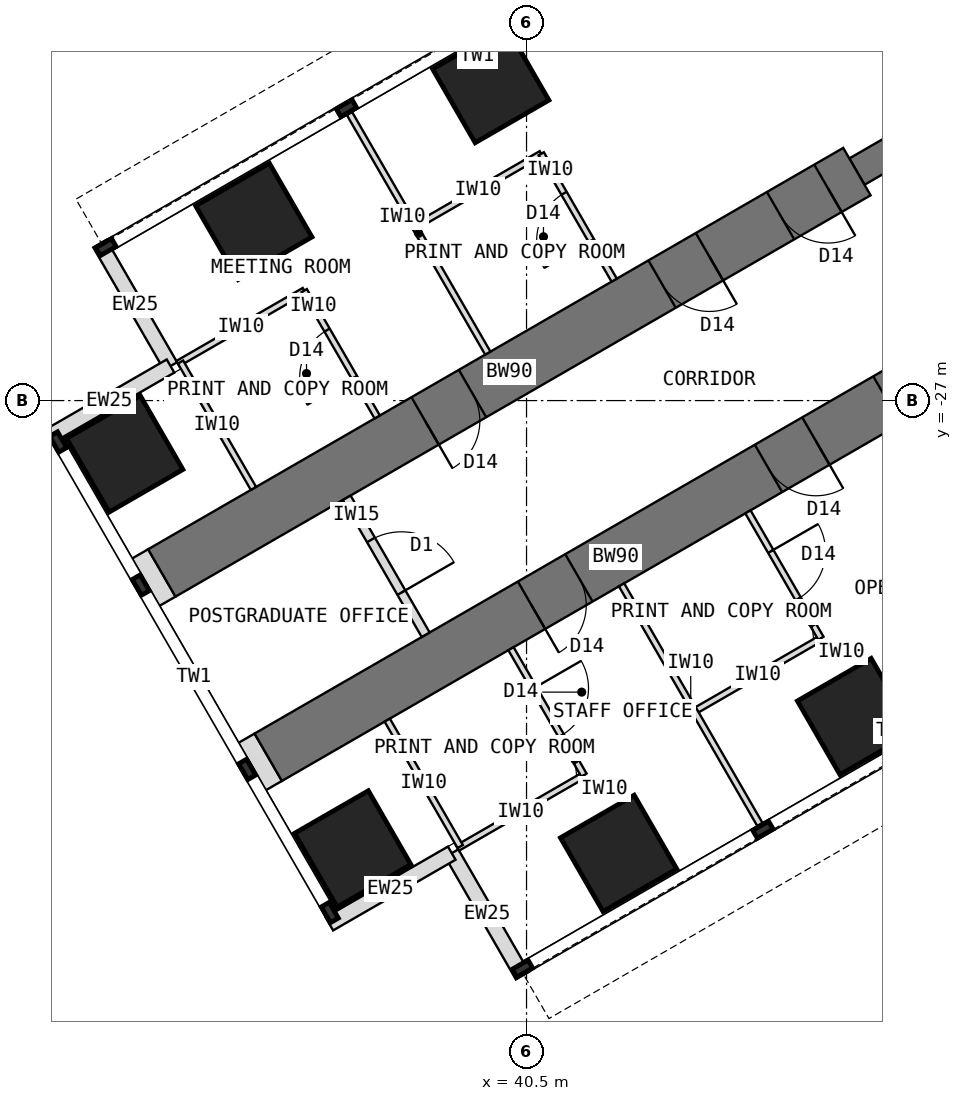
"""IFC4 building model, lengths in metres.
Left out: names, types, materials, properties, quantities, classifications, styles, units other than length and angle.
Written with IfcOpenShell. Run it as: python <this file> out.ifc"""

import sys

from ifc_helpers import new_model, si_unit, direction, frame, frame_2d, origin, origin_2d, place, context, subcontext, project, spatial, rectangle, extrude, element, fill, save


model = new_model("IFC4")
c1 = context("Model", 3, precision=1e-05, world=origin(), true_north=direction((0.0, 1.0)))
c2 = subcontext(c1, "Body", "Model", "MODEL_VIEW")
j1 = project(units=[si_unit("LENGTHUNIT", "METRE"), si_unit("PLANEANGLEUNIT", "RADIAN")], contexts=[c1])
p1 = place(None, origin())
s1 = spatial("IfcSite", under=j1, at=p1, CompositionType="ELEMENT")
p2 = place(p1, origin())
s2 = spatial("IfcBuilding", under=s1, at=p2, CompositionType="ELEMENT")
p3 = place(p2, frame((0.0, 0.0, 80.5)))
s3 = spatial("IfcBuildingStorey", under=s2, at=p3, CompositionType="ELEMENT", Elevation=80.5)
p4 = place(p3, frame((45.904, -18.0, 0.0), z_axis=(0.0, 0.0, 1.0), x_axis=(0.500024481964, -0.866011268655, 0.0)))
e1 = element("IfcWall", 1, at=p4, inside=s3, PredefinedType="SHEAR", context=c2, shape_type="SweptSolid", body=[
    extrude(rectangle(XDim=4.548, YDim=0.7, at=frame_2d((2.274, 0.0))), origin(), (0.0, 0.0, 1.0), 4.0),
])
p5 = place(p3, frame((47.684, -26.266, 0.0), z_axis=(0.0, 0.0, 1.0), x_axis=(-0.866027579429, -0.499996231654, 0.0)))
e2 = element("IfcWall", 2, at=p5, inside=s3, PredefinedType="SHEAR", context=c2, shape_type="SweptSolid", body=[
    extrude(rectangle(XDim=13.2, YDim=0.9, at=frame_2d((6.6, 0.0))), origin(), (0.0, 0.0, 1.0), 4.0),
])
p6 = place(p5, frame((0.55, 0.0, 0.0)))
e3 = element("IfcOpeningElement", 3, at=p6, cuts=e2, PredefinedType="OPENING", context=c2, shape_type="SweptSolid", body=[
    extrude(rectangle(XDim=0.9, YDim=2.1, at=frame_2d((0.45, 1.05))), frame((0.0, 0.46, 0.0), z_axis=(0.0, -1.0, 0.0), x_axis=(1.0, 0.0, 0.0)), (0.0, 0.0, 1.0), 0.92),
])
p7 = place(p5, frame((2.8, 0.0, 0.0)))
e4 = element("IfcOpeningElement", 4, at=p7, cuts=e2, PredefinedType="OPENING", context=c2, shape_type="SweptSolid", body=[
    extrude(rectangle(XDim=0.9, YDim=2.1, at=frame_2d((0.45, 1.05))), frame((0.0, 0.46, 0.0), z_axis=(0.0, -1.0, 0.0), x_axis=(1.0, 0.0, 0.0)), (0.0, 0.0, 1.0), 0.92),
])
p8 = place(p5, frame((7.3, 0.0, 0.0)))
e5 = element("IfcOpeningElement", 5, at=p8, cuts=e2, PredefinedType="OPENING", context=c2, shape_type="SweptSolid", body=[
    extrude(rectangle(XDim=0.9, YDim=2.1, at=frame_2d((0.45, 1.05))), frame((0.0, 0.46, 0.0), z_axis=(0.0, -1.0, 0.0), x_axis=(1.0, 0.0, 0.0)), (0.0, 0.0, 1.0), 0.92),
])
p9 = place(p3, frame((48.178, -21.939, 0.0), z_axis=(0.0, 0.0, 1.0), x_axis=(-0.866072649678, -0.499918158782, 0.0)))
e6 = element("IfcWall", 6, at=p9, inside=s3, PredefinedType="SHEAR", context=c2, shape_type="SweptSolid", body=[
    extrude(rectangle(XDim=2.592, YDim=0.5, at=frame_2d((1.296, 0.0))), origin(), (0.0, 0.0, 1.0), 4.0),
])
p10 = place(p3, frame((45.934, -23.234, 0.0), z_axis=(0.0, 0.0, 1.0), x_axis=(-0.866019570528, -0.500010103361, 0.0)))
e7 = element("IfcWall", 7, at=p10, inside=s3, PredefinedType="SHEAR", context=c2, shape_type="SweptSolid", body=[
    extrude(rectangle(XDim=13.2, YDim=0.9, at=frame_2d((6.6, 0.0))), origin(), (0.0, 0.0, 1.0), 4.0),
])
p11 = place(p10, frame((0.55, 0.0, 0.0)))
e8 = element("IfcOpeningElement", 8, at=p11, cuts=e7, PredefinedType="OPENING", context=c2, shape_type="SweptSolid", body=[
    extrude(rectangle(XDim=0.9, YDim=2.1, at=frame_2d((0.45, 1.05))), frame((0.0, 0.46, 0.0), z_axis=(0.0, -1.0, 0.0), x_axis=(1.0, 0.0, 0.0)), (0.0, 0.0, 1.0), 0.92),
])
p12 = place(p10, frame((2.8, 0.0, 0.0)))
e9 = element("IfcOpeningElement", 9, at=p12, cuts=e7, PredefinedType="OPENING", context=c2, shape_type="SweptSolid", body=[
    extrude(rectangle(XDim=0.9, YDim=2.1, at=frame_2d((0.45, 1.05))), frame((0.0, 0.46, 0.0), z_axis=(0.0, -1.0, 0.0), x_axis=(1.0, 0.0, 0.0)), (0.0, 0.0, 1.0), 0.92),
])
p13 = place(p10, frame((7.3, 0.0, 0.0)))
e10 = element("IfcOpeningElement", 10, at=p13, cuts=e7, PredefinedType="OPENING", context=c2, shape_type="SweptSolid", body=[
    extrude(rectangle(XDim=0.9, YDim=2.1, at=frame_2d((0.45, 1.05))), frame((0.0, 0.46, 0.0), z_axis=(0.0, -1.0, 0.0), x_axis=(1.0, 0.0, 0.0)), (0.0, 0.0, 1.0), 0.92),
])
for number, where, z_axis, x_axis in (
    (11, (45.912, -32.196, 0.0), (0.0, 0.0, 1.0), (0.866, 0.5, 0.0)),
    (12, (39.912, -21.804, 0.0), (0.0, 0.0, 1.0), (0.866, 0.5, 0.0)),
    (13, (42.014, -34.446, 0.0), (0.0, 0.0, 1.0), (0.866, 0.5, 0.0)),
    (14, (36.014, -24.054, 0.0), (0.0, 0.0, 1.0), (0.866, 0.5, 0.0)),
    (15, (37.642, -34.373, 0.0), (0.0, 0.0, 1.0), (0.866, 0.5, 0.0)),
    (16, (33.892, -27.877, 0.0), (0.0, 0.0, 1.0), (0.866, 0.5, 0.0)),
):
    element("IfcColumn", number, at=place(p3, frame(where, z_axis=z_axis, x_axis=x_axis)), inside=s3, PredefinedType="COLUMN", context=c2, shape_type="SweptSolid", body=[
        extrude(rectangle(XDim=1.4, YDim=1.4, at=origin_2d()), origin(), (0.0, 0.0, 1.0), 4.0),
    ])
for number, where, z_axis, x_axis in (
    (17, (40.433, -36.456, 0.0), (0.0, 0.0, 1.0), (-0.5, 0.866, 0.0)),
    (18, (39.27, -34.443, 0.0), (0.0, 0.0, 1.0), (-0.866, -0.5, 0.0)),
    (19, (33.483, -24.419, 0.0), (0.0, 0.0, 1.0), (0.5, -0.866, 0.0)),
    (20, (34.645, -26.432, 0.0), (0.0, 0.0, 1.0), (-0.866, -0.5, 0.0)),
):
    element("IfcWall", number, at=place(p3, frame(where, z_axis=z_axis, x_axis=x_axis)), inside=s3, PredefinedType="STANDARD", context=c2, shape_type="SweptSolid", body=[
        extrude(rectangle(XDim=2.325, YDim=0.25, at=frame_2d((1.163, 0.0))), origin(), (0.0, 0.0, 1.0), 3.8),
    ])
for number, where, z_axis, x_axis in (
    (21, (36.252, -32.865, 0.0), (0.0, 0.0, 1.0), (-0.866, -0.5, 0.0)),
    (22, (34.502, -29.834, 0.0), (0.0, 0.0, 1.0), (-0.866, -0.5, 0.0)),
):
    element("IfcWall", number, at=place(p3, frame(where, z_axis=z_axis, x_axis=x_axis)), inside=s3, PredefinedType="PARTITIONING", context=c2, shape_type="SweptSolid", body=[
        extrude(rectangle(XDim=0.31, YDim=0.9, at=frame_2d((0.155, 0.0))), origin(), (0.0, 0.0, 1.0), 3.8),
    ])
p14 = place(p3, frame((42.063, -30.03, 0.0), z_axis=(0.0, 0.0, 1.0), x_axis=(0.499982560684, -0.866035472144, 0.0)))
e23 = element("IfcWall", 23, at=p14, inside=s3, PredefinedType="PARTITIONING", context=c2, shape_type="SweptSolid", body=[
    extrude(rectangle(XDim=4.55, YDim=0.1, at=frame_2d((2.275, 0.0))), origin(), (0.0, 0.0, 1.0), 3.8),
])
p15 = place(p3, frame((45.342, -30.909, 0.0), z_axis=(0.0, 0.0, 1.0), x_axis=(-0.866050077142, -0.499957262057, 0.0)))
e24 = element("IfcWall", 24, at=p15, inside=s3, PredefinedType="PARTITIONING", context=c2, shape_type="SweptSolid", body=[
    extrude(rectangle(XDim=2.4, YDim=0.1, at=frame_2d((1.2, 0.0))), origin(), (0.0, 0.0, 1.0), 3.8),
])
p16 = place(p3, frame((44.141, -28.83, 0.0), z_axis=(0.0, 0.0, 1.0), x_axis=(0.500077600433, -0.865980596518, 0.0)))
e25 = element("IfcWall", 25, at=p16, inside=s3, PredefinedType="PARTITIONING", context=c2, shape_type="SweptSolid", body=[
    extrude(rectangle(XDim=2.4, YDim=0.1, at=frame_2d((1.2, 0.0))), origin(), (0.0, 0.0, 1.0), 3.8),
])
p17 = place(p16, frame((0.75, 0.0, 0.0)))
e26 = element("IfcOpeningElement", 26, at=p17, cuts=e25, PredefinedType="OPENING", context=c2, shape_type="SweptSolid", body=[
    extrude(rectangle(XDim=0.9, YDim=2.1, at=frame_2d((0.45, 1.05))), frame((0.0, 0.06, 0.0), z_axis=(0.0, -1.0, 0.0), x_axis=(1.0, 0.0, 0.0)), (0.0, 0.0, 1.0), 0.12),
])
p18 = place(p3, frame((41.444, -33.159, 0.0), z_axis=(0.0, 0.0, 1.0), x_axis=(-0.866024647952, -0.500001309137, 0.0)))
e27 = element("IfcWall", 27, at=p18, inside=s3, PredefinedType="PARTITIONING", context=c2, shape_type="SweptSolid", body=[
    extrude(rectangle(XDim=2.4, YDim=0.1, at=frame_2d((1.2, 0.0))), origin(), (0.0, 0.0, 1.0), 3.8),
])
p19 = place(p3, frame((40.244, -31.08, 0.0), z_axis=(0.0, 0.0, 1.0), x_axis=(0.500001309137, -0.866024647952, 0.0)))
e28 = element("IfcWall", 28, at=p19, inside=s3, PredefinedType="PARTITIONING", context=c2, shape_type="SweptSolid", body=[
    extrude(rectangle(XDim=2.4, YDim=0.1, at=frame_2d((1.2, 0.0))), origin(), (0.0, 0.0, 1.0), 3.8),
])
p20 = place(p19, frame((0.75, 0.0, 0.0)))
e29 = element("IfcOpeningElement", 29, at=p20, cuts=e28, PredefinedType="OPENING", context=c2, shape_type="SweptSolid", body=[
    extrude(rectangle(XDim=0.9, YDim=2.1, at=frame_2d((0.45, 1.05))), frame((0.0, 0.06, 0.0), z_axis=(0.0, -1.0, 0.0), x_axis=(1.0, 0.0, 0.0)), (0.0, 0.0, 1.0), 0.12),
])
p21 = place(p3, frame((38.209, -32.255, 0.0), z_axis=(0.0, 0.0, 1.0), x_axis=(0.500001309137, -0.866024647952, 0.0)))
e30 = element("IfcWall", 30, at=p21, inside=s3, PredefinedType="PARTITIONING", context=c2, shape_type="SweptSolid", body=[
    extrude(rectangle(XDim=2.4, YDim=0.1, at=frame_2d((1.2, 0.0))), origin(), (0.0, 0.0, 1.0), 3.8),
])
p22 = place(p3, frame((39.863, -26.22, 0.0), z_axis=(0.0, 0.0, 1.0), x_axis=(-0.500022803284, 0.866012237902, 0.0)))
e31 = element("IfcWall", 31, at=p22, inside=s3, PredefinedType="PARTITIONING", context=c2, shape_type="SweptSolid", body=[
    extrude(rectangle(XDim=4.55, YDim=0.1, at=frame_2d((2.275, 0.0))), origin(), (0.0, 0.0, 1.0), 3.8),
])
p23 = place(p3, frame((40.741, -22.941, 0.0), z_axis=(0.0, 0.0, 1.0), x_axis=(-0.865980596518, -0.500077600433, 0.0)))
e32 = element("IfcWall", 32, at=p23, inside=s3, PredefinedType="PARTITIONING", context=c2, shape_type="SweptSolid", body=[
    extrude(rectangle(XDim=2.4, YDim=0.1, at=frame_2d((1.2, 0.0))), origin(), (0.0, 0.0, 1.0), 3.8),
])
p24 = place(p3, frame((41.941, -25.02, 0.0), z_axis=(0.0, 0.0, 1.0), x_axis=(-0.499957262057, 0.866050077142, 0.0)))
e33 = element("IfcWall", 33, at=p24, inside=s3, PredefinedType="PARTITIONING", context=c2, shape_type="SweptSolid", body=[
    extrude(rectangle(XDim=2.4, YDim=0.1, at=frame_2d((1.2, 0.0))), origin(), (0.0, 0.0, 1.0), 3.8),
])
p25 = place(p24, frame((0.75, 0.0, 0.0)))
e34 = element("IfcOpeningElement", 34, at=p25, cuts=e33, PredefinedType="OPENING", context=c2, shape_type="SweptSolid", body=[
    extrude(rectangle(XDim=0.9, YDim=2.1, at=frame_2d((0.45, 1.05))), frame((0.0, 0.06, 0.0), z_axis=(0.0, -1.0, 0.0), x_axis=(1.0, 0.0, 0.0)), (0.0, 0.0, 1.0), 0.12),
])
p26 = place(p3, frame((36.844, -25.191, 0.0), z_axis=(0.0, 0.0, 1.0), x_axis=(-0.865980596518, -0.500077600433, 0.0)))
e35 = element("IfcWall", 35, at=p26, inside=s3, PredefinedType="PARTITIONING", context=c2, shape_type="SweptSolid", body=[
    extrude(rectangle(XDim=2.4, YDim=0.1, at=frame_2d((1.2, 0.0))), origin(), (0.0, 0.0, 1.0), 3.8),
])
p27 = place(p3, frame((38.044, -27.27, 0.0), z_axis=(0.0, 0.0, 1.0), x_axis=(-0.500033551112, 0.866006032174, 0.0)))
e36 = element("IfcWall", 36, at=p27, inside=s3, PredefinedType="PARTITIONING", context=c2, shape_type="SweptSolid", body=[
    extrude(rectangle(XDim=2.4, YDim=0.1, at=frame_2d((1.2, 0.0))), origin(), (0.0, 0.0, 1.0), 3.8),
])
p28 = place(p27, frame((0.75, 0.0, 0.0)))
e37 = element("IfcOpeningElement", 37, at=p28, cuts=e36, PredefinedType="OPENING", context=c2, shape_type="SweptSolid", body=[
    extrude(rectangle(XDim=0.9, YDim=2.1, at=frame_2d((0.45, 1.05))), frame((0.0, 0.06, 0.0), z_axis=(0.0, -1.0, 0.0), x_axis=(1.0, 0.0, 0.0)), (0.0, 0.0, 1.0), 0.12),
])
p29 = place(p3, frame((36.009, -28.445, 0.0), z_axis=(0.0, 0.0, 1.0), x_axis=(-0.500033551112, 0.866006032174, 0.0)))
e38 = element("IfcWall", 38, at=p29, inside=s3, PredefinedType="PARTITIONING", context=c2, shape_type="SweptSolid", body=[
    extrude(rectangle(XDim=2.4, YDim=0.1, at=frame_2d((1.2, 0.0))), origin(), (0.0, 0.0, 1.0), 3.8),
])
p30 = place(p3, frame((37.542, -28.599, 0.0), z_axis=(0.0, 0.0, 1.0), x_axis=(0.500006934395, -0.866021400173, 0.0)))
e39 = element("IfcWall", 39, at=p30, inside=s3, PredefinedType="PARTITIONING", context=c2, shape_type="SweptSolid", body=[
    extrude(rectangle(XDim=2.6, YDim=0.15, at=frame_2d((1.3, 0.0))), origin(), (0.0, 0.0, 1.0), 3.8),
])
p31 = place(p30, frame((0.8, 0.0, 0.0)))
e40 = element("IfcOpeningElement", 40, at=p31, cuts=e39, PredefinedType="OPENING", context=c2, shape_type="SweptSolid", body=[
    extrude(rectangle(XDim=1.0, YDim=2.1, at=frame_2d((0.5, 1.05))), frame((0.0, 0.085, 0.0), z_axis=(0.0, -1.0, 0.0), x_axis=(1.0, 0.0, 0.0)), (0.0, 0.0, 1.0), 0.17),
])
p32 = place(p17, origin())
e41 = element("IfcDoor", 41, at=p32, inside=s3, OperationType="SINGLE_SWING_LEFT", PredefinedType="DOOR", context=c2, shape_type="SweptSolid", body=[
    extrude(rectangle(XDim=0.9, YDim=2.1, at=frame_2d((0.45, 1.05))), frame((0.0, 0.025, 0.0), z_axis=(0.0, -1.0, 0.0), x_axis=(1.0, 0.0, 0.0)), (0.0, 0.0, 1.0), 0.05),
])
fill(e26, e41)
p33 = place(p20, origin())
e42 = element("IfcDoor", 42, at=p33, inside=s3, OperationType="SINGLE_SWING_LEFT", PredefinedType="DOOR", context=c2, shape_type="SweptSolid", body=[
    extrude(rectangle(XDim=0.9, YDim=2.1, at=frame_2d((0.45, 1.05))), frame((0.0, 0.025, 0.0), z_axis=(0.0, -1.0, 0.0), x_axis=(1.0, 0.0, 0.0)), (0.0, 0.0, 1.0), 0.05),
])
fill(e29, e42)
p34 = place(p25, origin())
e43 = element("IfcDoor", 43, at=p34, inside=s3, OperationType="SINGLE_SWING_LEFT", PredefinedType="DOOR", context=c2, shape_type="SweptSolid", body=[
    extrude(rectangle(XDim=0.9, YDim=2.1, at=frame_2d((0.45, 1.05))), frame((0.0, 0.025, 0.0), z_axis=(0.0, -1.0, 0.0), x_axis=(1.0, 0.0, 0.0)), (0.0, 0.0, 1.0), 0.05),
])
fill(e34, e43)
p35 = place(p28, origin())
e44 = element("IfcDoor", 44, at=p35, inside=s3, OperationType="SINGLE_SWING_LEFT", PredefinedType="DOOR", context=c2, shape_type="SweptSolid", body=[
    extrude(rectangle(XDim=0.9, YDim=2.1, at=frame_2d((0.45, 1.05))), frame((0.0, 0.025, 0.0), z_axis=(0.0, -1.0, 0.0), x_axis=(1.0, 0.0, 0.0)), (0.0, 0.0, 1.0), 0.05),
])
fill(e37, e44)
p36 = place(p31, origin())
e45 = element("IfcDoor", 45, at=p36, inside=s3, OperationType="SINGLE_SWING_RIGHT", PredefinedType="DOOR", context=c2, shape_type="SweptSolid", body=[
    extrude(rectangle(XDim=1.0, YDim=2.1, at=frame_2d((0.5, 1.05))), frame((0.0, 0.025, 0.0), z_axis=(0.0, -1.0, 0.0), x_axis=(1.0, 0.0, 0.0)), (0.0, 0.0, 1.0), 0.05),
])
fill(e40, e45)
p37 = place(p6, origin())
e46 = element("IfcDoor", 46, at=p37, inside=s3, OperationType="SINGLE_SWING_LEFT", PredefinedType="DOOR", context=c2, shape_type="SweptSolid", body=[
    extrude(rectangle(XDim=0.82, YDim=2.06, at=frame_2d((0.45, 1.03))), frame((0.0, 0.025, 0.0), z_axis=(0.0, -1.0, 0.0), x_axis=(1.0, 0.0, 0.0)), (0.0, 0.0, 1.0), 0.05),
    extrude(rectangle(XDim=0.04, YDim=2.1, at=frame_2d((0.02, 1.05))), frame((0.0, 0.45, 0.0), z_axis=(0.0, -1.0, 0.0), x_axis=(1.0, 0.0, 0.0)), (0.0, 0.0, 1.0), 0.899),
    extrude(rectangle(XDim=0.04, YDim=2.1, at=frame_2d((0.88, 1.05))), frame((0.0, 0.45, 0.0), z_axis=(0.0, -1.0, 0.0), x_axis=(1.0, 0.0, 0.0)), (0.0, 0.0, 1.0), 0.899),
    extrude(rectangle(XDim=0.82, YDim=0.04, at=frame_2d((0.45, 2.08))), frame((0.0, 0.45, 0.0), z_axis=(0.0, -1.0, 0.0), x_axis=(1.0, 0.0, 0.0)), (0.0, 0.0, 1.0), 0.899),
])
fill(e3, e46)
p38 = place(p7, origin())
e47 = element("IfcDoor", 47, at=p38, inside=s3, OperationType="SINGLE_SWING_LEFT", PredefinedType="DOOR", context=c2, shape_type="SweptSolid", body=[
    extrude(rectangle(XDim=0.82, YDim=2.06, at=frame_2d((0.45, 1.03))), frame((0.0, 0.025, 0.0), z_axis=(0.0, -1.0, 0.0), x_axis=(1.0, 0.0, 0.0)), (0.0, 0.0, 1.0), 0.05),
    extrude(rectangle(XDim=0.04, YDim=2.1, at=frame_2d((0.02, 1.05))), frame((0.0, 0.45, 0.0), z_axis=(0.0, -1.0, 0.0), x_axis=(1.0, 0.0, 0.0)), (0.0, 0.0, 1.0), 0.899),
    extrude(rectangle(XDim=0.04, YDim=2.1, at=frame_2d((0.88, 1.05))), frame((0.0, 0.45, 0.0), z_axis=(0.0, -1.0, 0.0), x_axis=(1.0, 0.0, 0.0)), (0.0, 0.0, 1.0), 0.899),
    extrude(rectangle(XDim=0.82, YDim=0.04, at=frame_2d((0.45, 2.08))), frame((0.0, 0.45, 0.0), z_axis=(0.0, -1.0, 0.0), x_axis=(1.0, 0.0, 0.0)), (0.0, 0.0, 1.0), 0.899),
])
fill(e4, e47)
p39 = place(p8, origin())
e48 = element("IfcDoor", 48, at=p39, inside=s3, OperationType="SINGLE_SWING_RIGHT", PredefinedType="DOOR", context=c2, shape_type="SweptSolid", body=[
    extrude(rectangle(XDim=0.82, YDim=2.06, at=frame_2d((0.45, 1.03))), frame((0.0, 0.025, 0.0), z_axis=(0.0, -1.0, 0.0), x_axis=(1.0, 0.0, 0.0)), (0.0, 0.0, 1.0), 0.05),
    extrude(rectangle(XDim=0.04, YDim=2.1, at=frame_2d((0.02, 1.05))), frame((0.0, 0.45, 0.0), z_axis=(0.0, -1.0, 0.0), x_axis=(1.0, 0.0, 0.0)), (0.0, 0.0, 1.0), 0.899),
    extrude(rectangle(XDim=0.04, YDim=2.1, at=frame_2d((0.88, 1.05))), frame((0.0, 0.45, 0.0), z_axis=(0.0, -1.0, 0.0), x_axis=(1.0, 0.0, 0.0)), (0.0, 0.0, 1.0), 0.899),
    extrude(rectangle(XDim=0.82, YDim=0.04, at=frame_2d((0.45, 2.08))), frame((0.0, 0.45, 0.0), z_axis=(0.0, -1.0, 0.0), x_axis=(1.0, 0.0, 0.0)), (0.0, 0.0, 1.0), 0.899),
])
fill(e5, e48)
p40 = place(p11, origin())
e49 = element("IfcDoor", 49, at=p40, inside=s3, OperationType="SINGLE_SWING_LEFT", PredefinedType="DOOR", context=c2, shape_type="SweptSolid", body=[
    extrude(rectangle(XDim=0.82, YDim=2.06, at=frame_2d((0.45, 1.03))), frame((0.0, 0.025, 0.0), z_axis=(0.0, -1.0, 0.0), x_axis=(1.0, 0.0, 0.0)), (0.0, 0.0, 1.0), 0.05),
    extrude(rectangle(XDim=0.04, YDim=2.1, at=frame_2d((0.02, 1.05))), frame((0.0, 0.45, 0.0), z_axis=(0.0, -1.0, 0.0), x_axis=(1.0, 0.0, 0.0)), (0.0, 0.0, 1.0), 0.899),
    extrude(rectangle(XDim=0.04, YDim=2.1, at=frame_2d((0.88, 1.05))), frame((0.0, 0.45, 0.0), z_axis=(0.0, -1.0, 0.0), x_axis=(1.0, 0.0, 0.0)), (0.0, 0.0, 1.0), 0.899),
    extrude(rectangle(XDim=0.82, YDim=0.04, at=frame_2d((0.45, 2.08))), frame((0.0, 0.45, 0.0), z_axis=(0.0, -1.0, 0.0), x_axis=(1.0, 0.0, 0.0)), (0.0, 0.0, 1.0), 0.899),
])
fill(e8, e49)
p41 = place(p12, origin())
e50 = element("IfcDoor", 50, at=p41, inside=s3, OperationType="SINGLE_SWING_LEFT", PredefinedType="DOOR", context=c2, shape_type="SweptSolid", body=[
    extrude(rectangle(XDim=0.82, YDim=2.06, at=frame_2d((0.45, 1.03))), frame((0.0, 0.025, 0.0), z_axis=(0.0, -1.0, 0.0), x_axis=(1.0, 0.0, 0.0)), (0.0, 0.0, 1.0), 0.05),
    extrude(rectangle(XDim=0.04, YDim=2.1, at=frame_2d((0.02, 1.05))), frame((0.0, 0.45, 0.0), z_axis=(0.0, -1.0, 0.0), x_axis=(1.0, 0.0, 0.0)), (0.0, 0.0, 1.0), 0.899),
    extrude(rectangle(XDim=0.04, YDim=2.1, at=frame_2d((0.88, 1.05))), frame((0.0, 0.45, 0.0), z_axis=(0.0, -1.0, 0.0), x_axis=(1.0, 0.0, 0.0)), (0.0, 0.0, 1.0), 0.899),
    extrude(rectangle(XDim=0.82, YDim=0.04, at=frame_2d((0.45, 2.08))), frame((0.0, 0.45, 0.0), z_axis=(0.0, -1.0, 0.0), x_axis=(1.0, 0.0, 0.0)), (0.0, 0.0, 1.0), 0.899),
])
fill(e9, e50)
p42 = place(p13, origin())
e51 = element("IfcDoor", 51, at=p42, inside=s3, OperationType="SINGLE_SWING_RIGHT", PredefinedType="DOOR", context=c2, shape_type="SweptSolid", body=[
    extrude(rectangle(XDim=0.82, YDim=2.06, at=frame_2d((0.45, 1.03))), frame((0.0, 0.025, 0.0), z_axis=(0.0, -1.0, 0.0), x_axis=(1.0, 0.0, 0.0)), (0.0, 0.0, 1.0), 0.05),
    extrude(rectangle(XDim=0.04, YDim=2.1, at=frame_2d((0.02, 1.05))), frame((0.0, 0.45, 0.0), z_axis=(0.0, -1.0, 0.0), x_axis=(1.0, 0.0, 0.0)), (0.0, 0.0, 1.0), 0.899),
    extrude(rectangle(XDim=0.04, YDim=2.1, at=frame_2d((0.88, 1.05))), frame((0.0, 0.45, 0.0), z_axis=(0.0, -1.0, 0.0), x_axis=(1.0, 0.0, 0.0)), (0.0, 0.0, 1.0), 0.899),
    extrude(rectangle(XDim=0.82, YDim=0.04, at=frame_2d((0.45, 2.08))), frame((0.0, 0.45, 0.0), z_axis=(0.0, -1.0, 0.0), x_axis=(1.0, 0.0, 0.0)), (0.0, 0.0, 1.0), 0.899),
])
fill(e10, e51)
save(model, sys.argv[1])
